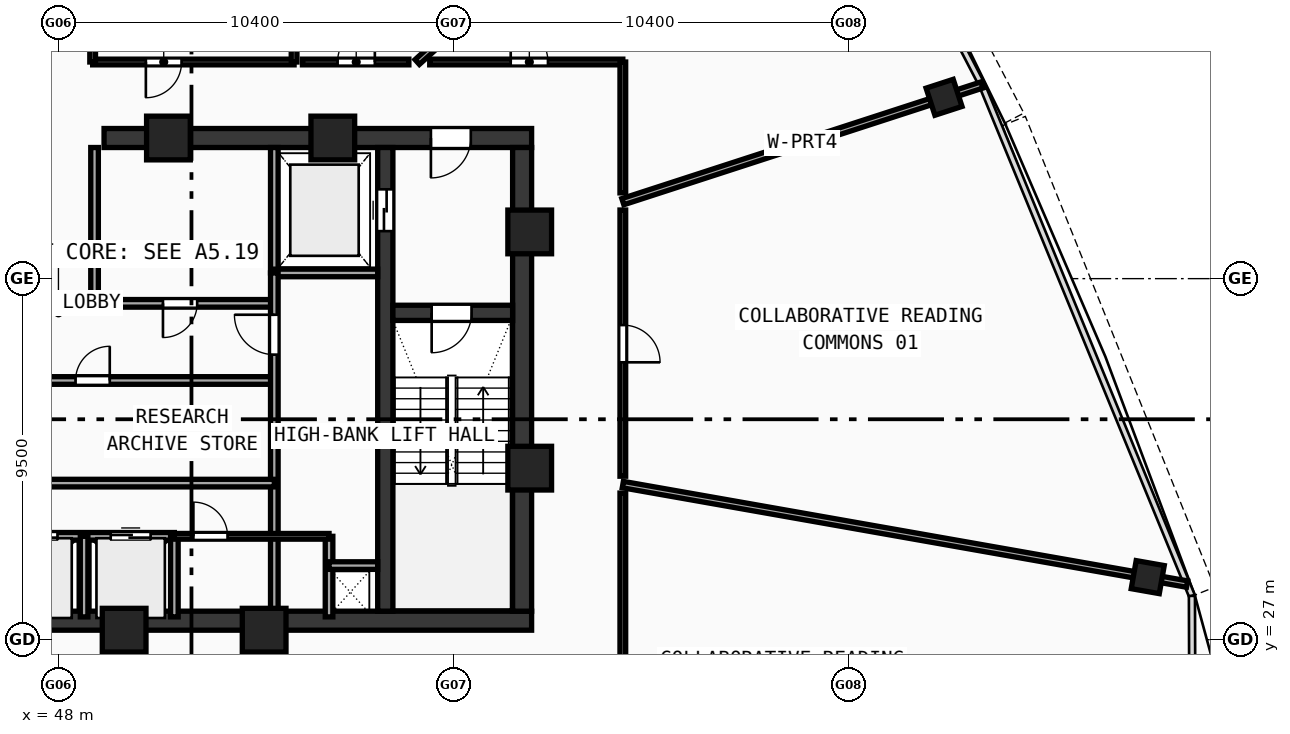
"""IFC4 building model, lengths in metres.
Left out: names, types, materials, properties, quantities, classifications, styles, units other than length and angle.
Written with IfcOpenShell. Run it as: python <this file> out.ifc"""

import sys

from ifc_helpers import new_model, si_unit, direction, frame, frame_2d, origin, origin_with_axes, origin_2d, place, context, subcontext, project, spatial, rectangle, hollow_rectangle, extrude, source, transform, mapped, element, fill, save


model = new_model("IFC4")
c1 = context("Model", 3, precision=1e-05, world=origin(), true_north=direction((0.0, 1.0)))
c2 = subcontext(c1, "Body", "Model", "MODEL_VIEW")
j1 = project(units=[si_unit("LENGTHUNIT", "METRE"), si_unit("PLANEANGLEUNIT", "RADIAN")], contexts=[c1])
p1 = place(None, origin())
s1 = spatial("IfcSite", under=j1, at=p1, CompositionType="ELEMENT")
p2 = place(p1, origin())
s2 = spatial("IfcBuilding", under=s1, at=p2, CompositionType="ELEMENT")
p3 = place(p2, frame((0.0, 0.0, 311.13)))
s3 = spatial("IfcBuildingStorey", under=s2, at=p3, CompositionType="ELEMENT", Elevation=311.13)
p4 = place(p3, frame((35.55, 27.5, 0.0), z_axis=(0.0, 0.0, 1.0), x_axis=(1.0, 0.0, 0.0)))
e1 = element("IfcWall", 1, at=p4, inside=s3, PredefinedType="SHEAR", context=c2, shape_type="SweptSolid", body=[
    extrude(rectangle(XDim=24.9, YDim=0.5, at=frame_2d((12.45, 0.0))), origin(), (0.0, 0.0, 1.0), 3.47),
])
p5 = place(p3, frame((49.2, 40.2, 0.0), z_axis=(0.0, 0.0, 1.0), x_axis=(1.0, 0.0, 0.0)))
e2 = element("IfcWall", 2, at=p5, inside=s3, PredefinedType="SHEAR", context=c2, shape_type="SweptSolid", body=[
    extrude(rectangle(XDim=11.25, YDim=0.5, at=frame_2d((5.625, 0.0))), origin(), (0.0, 0.0, 1.0), 3.47),
])
p6 = place(p5, frame((8.6, 0.0, 0.0)))
e3 = element("IfcOpeningElement", 3, at=p6, cuts=e2, PredefinedType="OPENING", context=c2, shape_type="SweptSolid", body=[
    extrude(rectangle(XDim=1.05, YDim=2.1, at=frame_2d((0.525, 1.05))), frame((0.0, 0.26, 0.0), z_axis=(0.0, -1.0, 0.0), x_axis=(1.0, 0.0, 0.0)), (0.0, 0.0, 1.0), 0.52),
])
p7 = place(p3, frame((60.2, 27.75, 0.0), z_axis=(0.0, 0.0, 1.0), x_axis=(0.0, 1.0, 0.0)))
e4 = element("IfcWall", 4, at=p7, inside=s3, PredefinedType="SHEAR", context=c2, shape_type="SweptSolid", body=[
    extrude(rectangle(XDim=12.2, YDim=0.5, at=frame_2d((6.1, 0.0))), origin(), (0.0, 0.0, 1.0), 3.47),
])
p8 = place(p3, frame((56.6, 27.75, 0.0), z_axis=(0.0, 0.0, 1.0), x_axis=(0.0, 1.0, 0.0)))
e5 = element("IfcWall", 5, at=p8, inside=s3, PredefinedType="SHEAR", context=c2, shape_type="SweptSolid", body=[
    extrude(rectangle(XDim=12.2, YDim=0.4, at=frame_2d((6.1, 0.0))), origin(), (0.0, 0.0, 1.0), 3.47),
])
p9 = place(p8, frame((10.0, 0.0, 0.0)))
e6 = element("IfcOpeningElement", 6, at=p9, cuts=e5, PredefinedType="OPENING", context=c2, shape_type="SweptSolid", body=[
    extrude(rectangle(XDim=1.1, YDim=2.1, at=frame_2d((0.55, 1.05))), frame((0.0, 0.21, 0.0), z_axis=(0.0, -1.0, 0.0), x_axis=(1.0, 0.0, 0.0)), (0.0, 0.0, 1.0), 0.42),
])
p10 = place(p3, frame((56.8, 35.6, 0.0), z_axis=(0.0, 0.0, 1.0), x_axis=(1.0, 0.0, 0.0)))
e7 = element("IfcWall", 7, at=p10, inside=s3, PredefinedType="SHEAR", context=c2, shape_type="SweptSolid", body=[
    extrude(rectangle(XDim=3.15, YDim=0.4, at=frame_2d((1.575, 0.0))), origin(), (0.0, 0.0, 1.0), 3.47),
])
p11 = place(p10, frame((1.02, 0.0, 0.0)))
e8 = element("IfcOpeningElement", 8, at=p11, cuts=e7, PredefinedType="OPENING", context=c2, shape_type="SweptSolid", body=[
    extrude(rectangle(XDim=1.05, YDim=2.1, at=frame_2d((0.525, 1.05))), frame((0.0, 0.21, 0.0), z_axis=(0.0, -1.0, 0.0), x_axis=(1.0, 0.0, 0.0)), (0.0, 0.0, 1.0), 0.42),
])
m1 = source(origin(), c2, "Body", "SweptSolid", [
    extrude(hollow_rectangle(XDim=1.15, YDim=1.15, WallThickness=0.048, at=origin_2d()), origin(), (0.0, 0.0, 1.0), 3.73),
])
for number, where, z_axis, x_axis in (
    (9, (49.729, 27.25, -0.26), (0.0, 0.0, 1.0), (1.0, 0.0, 0.0)),
    (10, (53.412, 27.25, -0.26), (0.0, 0.0, 1.0), (1.0, 0.0, 0.0)),
    (11, (60.4, 31.513, -0.26), (0.0, 0.0, 1.0), (1.0, 0.0, 0.0)),
    (12, (60.4, 37.729, -0.26), (0.0, 0.0, 1.0), (1.0, 0.0, 0.0)),
    (13, (55.219, 40.2, -0.26), (0.0, 0.0, 1.0), (1.0, 0.0, 0.0)),
    (14, (50.894, 40.2, -0.26), (0.0, 0.0, 1.0), (1.0, 0.0, 0.0)),
):
    element("IfcColumn", number, at=place(p3, frame(where, z_axis=z_axis, x_axis=x_axis)), inside=s3, PredefinedType="COLUMN", context=c2, shape_type="MappedRepresentation", body=[
        mapped(m1, transform((0.0, 0.0, 0.0), scale=1.0)),
    ])
m2 = source(origin(), c2, "Body", "SweptSolid", [
    extrude(hollow_rectangle(XDim=0.75, YDim=0.75, WallThickness=0.028, at=origin_2d()), origin(), (0.0, 0.0, 1.0), 3.73),
])
for number, where, z_axis, x_axis in (
    (15, (76.662, 28.646, -0.26), (0.0, 0.0, 1.0), (0.174, 0.985, 0.0)),
    (16, (71.302, 41.271, -0.26), (0.0, 0.0, 1.0), (-0.309, 0.951, 0.0)),
):
    element("IfcColumn", number, at=place(p3, frame(where, z_axis=z_axis, x_axis=x_axis)), inside=s3, PredefinedType="COLUMN", context=c2, shape_type="MappedRepresentation", body=[
        mapped(m2, transform((0.0, 0.0, 0.0), scale=1.0)),
    ])
p12 = place(p3, frame((53.68, 36.65, 0.0), z_axis=(0.0, 0.0, 1.0), x_axis=(0.0, 1.0, 0.0)))
e17 = element("IfcWall", 17, at=p12, inside=s3, PredefinedType="SOLIDWALL", context=c2, shape_type="SweptSolid", body=[
    extrude(rectangle(XDim=3.3, YDim=0.2, at=frame_2d((1.65, 0.0))), origin(), (0.0, 0.0, 1.0), 3.47),
])
p13 = place(p3, frame((53.68, 36.65, 0.0), z_axis=(0.0, 0.0, 1.0), x_axis=(1.0, 0.0, 0.0)))
e18 = element("IfcWall", 18, at=p13, inside=s3, PredefinedType="SOLIDWALL", context=c2, shape_type="SweptSolid", body=[
    extrude(rectangle(XDim=2.72, YDim=0.2, at=frame_2d((1.36, 0.0))), origin(), (0.0, 0.0, 1.0), 3.47),
])
p14 = place(p3, frame((48.95, 35.85, 0.0), z_axis=(0.0, 0.0, 1.0), x_axis=(1.0, 0.0, 0.0)))
e19 = element("IfcWall", 19, at=p14, inside=s3, PredefinedType="SOLIDWALL", context=c2, shape_type="SweptSolid", body=[
    extrude(rectangle(XDim=4.73, YDim=0.2, at=frame_2d((2.365, 0.0))), origin(), (0.0, 0.0, 1.0), 3.47),
])
p15 = place(p14, frame((1.8, 0.0, 0.0)))
e20 = element("IfcOpeningElement", 20, at=p15, cuts=e19, PredefinedType="OPENING", context=c2, shape_type="SweptSolid", body=[
    extrude(rectangle(XDim=0.9, YDim=2.1, at=frame_2d((0.45, 1.05))), frame((0.0, 0.11, 0.0), z_axis=(0.0, -1.0, 0.0), x_axis=(1.0, 0.0, 0.0)), (0.0, 0.0, 1.0), 0.22),
])
p16 = place(p3, frame((48.95, 35.85, 0.0), z_axis=(0.0, 0.0, 1.0), x_axis=(0.0, 1.0, 0.0)))
e21 = element("IfcWall", 21, at=p16, inside=s3, PredefinedType="SOLIDWALL", context=c2, shape_type="SweptSolid", body=[
    extrude(rectangle(XDim=4.1, YDim=0.2, at=frame_2d((2.05, 0.0))), origin(), (0.0, 0.0, 1.0), 3.47),
])
p17 = place(p3, frame((43.85, 33.82, 0.0), z_axis=(0.0, 0.0, 1.0), x_axis=(1.0, 0.0, 0.0)))
e22 = element("IfcWall", 22, at=p17, inside=s3, PredefinedType="SOLIDWALL", context=c2, shape_type="SweptSolid", body=[
    extrude(rectangle(XDim=9.83, YDim=0.2, at=frame_2d((4.915, 0.0))), origin(), (0.0, 0.0, 1.0), 3.47),
])
p18 = place(p17, frame((1.2, 0.0, 0.0)))
e23 = element("IfcOpeningElement", 23, at=p18, cuts=e22, PredefinedType="OPENING", context=c2, shape_type="SweptSolid", body=[
    extrude(rectangle(XDim=0.9, YDim=2.1, at=frame_2d((0.45, 1.05))), frame((0.0, 0.11, 0.0), z_axis=(0.0, -1.0, 0.0), x_axis=(1.0, 0.0, 0.0)), (0.0, 0.0, 1.0), 0.22),
])
p19 = place(p17, frame((4.6, 0.0, 0.0)))
e24 = element("IfcOpeningElement", 24, at=p19, cuts=e22, PredefinedType="OPENING", context=c2, shape_type="SweptSolid", body=[
    extrude(rectangle(XDim=0.9, YDim=2.1, at=frame_2d((0.45, 1.05))), frame((0.0, 0.11, 0.0), z_axis=(0.0, -1.0, 0.0), x_axis=(1.0, 0.0, 0.0)), (0.0, 0.0, 1.0), 0.22),
])
p20 = place(p3, frame((53.68, 27.6, 0.0), z_axis=(0.0, 0.0, 1.0), x_axis=(0.0, 1.0, 0.0)))
e25 = element("IfcWall", 25, at=p20, inside=s3, PredefinedType="SOLIDWALL", context=c2, shape_type="SweptSolid", body=[
    extrude(rectangle(XDim=9.05, YDim=0.2, at=frame_2d((4.525, 0.0))), origin(), (0.0, 0.0, 1.0), 3.47),
])
p21 = place(p20, frame((6.9, 0.0, 0.0)))
e26 = element("IfcOpeningElement", 26, at=p21, cuts=e25, PredefinedType="OPENING", context=c2, shape_type="SweptSolid", body=[
    extrude(rectangle(XDim=1.05, YDim=2.1, at=frame_2d((0.525, 1.05))), frame((0.0, 0.11, 0.0), z_axis=(0.0, -1.0, 0.0), x_axis=(1.0, 0.0, 0.0)), (0.0, 0.0, 1.0), 0.22),
])
p22 = place(p3, frame((43.85, 29.72, 0.0), z_axis=(0.0, 0.0, 1.0), x_axis=(1.0, 0.0, 0.0)))
e27 = element("IfcWall", 27, at=p22, inside=s3, PredefinedType="SOLIDWALL", context=c2, shape_type="SweptSolid", body=[
    extrude(rectangle(XDim=7.2, YDim=0.2, at=frame_2d((3.6, 0.0))), origin(), (0.0, 0.0, 1.0), 3.47),
])
p23 = place(p22, frame((0.625, 0.0, 0.0)))
e28 = element("IfcOpeningElement", 28, at=p23, cuts=e27, PredefinedType="OPENING", context=c2, shape_type="SweptSolid", body=[
    extrude(rectangle(XDim=1.05, YDim=2.1, at=frame_2d((0.525, 1.05))), frame((0.0, 0.11, 0.0), z_axis=(0.0, -1.0, 0.0), x_axis=(1.0, 0.0, 0.0)), (0.0, 0.0, 1.0), 0.22),
])
p24 = place(p22, frame((3.075, 0.0, 0.0)))
e29 = element("IfcOpeningElement", 29, at=p24, cuts=e27, PredefinedType="OPENING", context=c2, shape_type="SweptSolid", body=[
    extrude(rectangle(XDim=1.05, YDim=2.1, at=frame_2d((0.525, 1.05))), frame((0.0, 0.11, 0.0), z_axis=(0.0, -1.0, 0.0), x_axis=(1.0, 0.0, 0.0)), (0.0, 0.0, 1.0), 0.22),
])
p25 = place(p22, frame((5.525, 0.0, 0.0)))
e30 = element("IfcOpeningElement", 30, at=p25, cuts=e27, PredefinedType="OPENING", context=c2, shape_type="SweptSolid", body=[
    extrude(rectangle(XDim=1.05, YDim=2.1, at=frame_2d((0.525, 1.05))), frame((0.0, 0.11, 0.0), z_axis=(0.0, -1.0, 0.0), x_axis=(1.0, 0.0, 0.0)), (0.0, 0.0, 1.0), 0.22),
])
p26 = place(p3, frame((51.05, 27.6, 0.0), z_axis=(0.0, 0.0, 1.0), x_axis=(0.0, 1.0, 0.0)))
e31 = element("IfcWall", 31, at=p26, inside=s3, PredefinedType="SOLIDWALL", context=c2, shape_type="SweptSolid", body=[
    extrude(rectangle(XDim=2.12, YDim=0.2, at=frame_2d((1.06, 0.0))), origin(), (0.0, 0.0, 1.0), 3.47),
])
p27 = place(p3, frame((43.85, 31.12, 0.0), z_axis=(0.0, 0.0, 1.0), x_axis=(1.0, 0.0, 0.0)))
e32 = element("IfcWall", 32, at=p27, inside=s3, PredefinedType="SOLIDWALL", context=c2, shape_type="SweptSolid", body=[
    extrude(rectangle(XDim=9.83, YDim=0.2, at=frame_2d((4.915, 0.0))), origin(), (0.0, 0.0, 1.0), 3.47),
])
for number, where, z_axis, x_axis in (
    (33, (48.675, 27.6, 0.0), (0.0, 0.0, 1.0), (0.0, 1.0, 0.0)),
    (34, (55.12, 27.6, 0.0), (0.0, 0.0, 1.0), (0.0, 1.0, 0.0)),
):
    element("IfcWall", number, at=place(p3, frame(where, z_axis=z_axis, x_axis=x_axis)), inside=s3, PredefinedType="SOLIDWALL", context=c2, shape_type="SweptSolid", body=[
        extrude(rectangle(XDim=2.12, YDim=0.2, at=frame_2d((1.06, 0.0))), origin(), (0.0, 0.0, 1.0), 3.47),
    ])
p28 = place(p3, frame((55.12, 28.95, 0.0), z_axis=(0.0, 0.0, 1.0), x_axis=(1.0, 0.0, 0.0)))
e35 = element("IfcWall", 35, at=p28, inside=s3, PredefinedType="SOLIDWALL", context=c2, shape_type="SweptSolid", body=[
    extrude(rectangle(XDim=1.28, YDim=0.2, at=frame_2d((0.64, 0.0))), origin(), (0.0, 0.0, 1.0), 3.47),
])
p29 = place(p3, frame((51.05, 29.72, 0.0), z_axis=(0.0, 0.0, 1.0), x_axis=(1.0, 0.0, 0.0)))
e36 = element("IfcWall", 36, at=p29, inside=s3, PredefinedType="PARTITIONING", context=c2, shape_type="SweptSolid", body=[
    extrude(rectangle(XDim=4.07, YDim=0.15, at=frame_2d((2.035, 0.0))), origin(), (0.0, 0.0, 1.0), 3.47),
])
p30 = place(p29, frame((0.5, 0.0, 0.0)))
e37 = element("IfcOpeningElement", 37, at=p30, cuts=e36, PredefinedType="OPENING", context=c2, shape_type="SweptSolid", body=[
    extrude(rectangle(XDim=0.9, YDim=2.1, at=frame_2d((0.45, 1.05))), frame((0.0, 0.085, 0.0), z_axis=(0.0, -1.0, 0.0), x_axis=(1.0, 0.0, 0.0)), (0.0, 0.0, 1.0), 0.17),
])
p31 = place(p3, frame((48.9, 42.2, 0.0), z_axis=(0.0, 0.0, 1.0), x_axis=(1.0, 0.0, 0.0)))
e38 = element("IfcWall", 38, at=p31, inside=s3, PredefinedType="PARTITIONING", context=c2, shape_type="SweptSolid", body=[
    extrude(rectangle(XDim=5.3, YDim=0.15, at=frame_2d((2.65, 0.0))), origin(), (0.0, 0.0, 1.0), 2.87),
])
p32 = place(p31, frame((1.4, 0.0, 0.0)))
e39 = element("IfcOpeningElement", 39, at=p32, cuts=e38, PredefinedType="OPENING", context=c2, shape_type="SweptSolid", body=[
    extrude(rectangle(XDim=0.94, YDim=2.1, at=frame_2d((0.47, 1.05))), frame((0.0, 0.085, 0.0), z_axis=(0.0, -1.0, 0.0), x_axis=(1.0, 0.0, 0.0)), (0.0, 0.0, 1.0), 0.17),
])
for number, where, z_axis, x_axis in (
    (40, (48.9, 42.2, 0.0), (0.0, 0.0, 1.0), (0.0, 1.0, 0.0)),
    (41, (54.2, 42.2, 0.0), (0.0, 0.0, 1.0), (0.0, 1.0, 0.0)),
):
    element("IfcWall", number, at=place(p3, frame(where, z_axis=z_axis, x_axis=x_axis)), inside=s3, PredefinedType="PARTITIONING", context=c2, shape_type="SweptSolid", body=[
        extrude(rectangle(XDim=3.6, YDim=0.15, at=frame_2d((1.8, 0.0))), origin(), (0.0, 0.0, 1.0), 3.47),
    ])
p33 = place(p3, frame((62.85, 38.525, 0.0), z_axis=(0.0, 0.0, 1.0), x_axis=(0.951056273407, 0.309017741906, 0.0)))
e42 = element("IfcWall", 42, at=p33, inside=s3, PredefinedType="PARTITIONING", context=c2, shape_type="SweptSolid", body=[
    extrude(rectangle(XDim=9.937, YDim=0.17, at=frame_2d((4.969, 0.0))), origin(), (0.0, 0.0, 1.0), 2.87),
])
p34 = place(p3, frame((57.44, 42.2, 0.0), z_axis=(0.0, 0.0, 1.0), x_axis=(0.743143971996, 0.669131554245, 0.0)))
e43 = element("IfcWall", 43, at=p34, inside=s3, PredefinedType="PARTITIONING", context=c2, shape_type="SweptSolid", body=[
    extrude(rectangle(XDim=13.34, YDim=0.17, at=frame_2d((6.67, 0.0))), origin(), (0.0, 0.0, 1.0), 2.87),
])
p35 = place(p3, frame((62.85, 31.082, 0.0), z_axis=(0.0, 0.0, 1.0), x_axis=(0.984808005161, -0.173646747654, 0.0)))
e44 = element("IfcWall", 44, at=p35, inside=s3, PredefinedType="PARTITIONING", context=c2, shape_type="SweptSolid", body=[
    extrude(rectangle(XDim=15.075, YDim=0.17, at=frame_2d((7.537, 0.0))), origin(), (0.0, 0.0, 1.0), 2.87),
])
p36 = place(p3, frame((54.42, 42.2, 0.0), z_axis=(0.0, 0.0, 1.0), x_axis=(1.0, 0.0, 0.0)))
e45 = element("IfcWall", 45, at=p36, inside=s3, PredefinedType="PARTITIONING", context=c2, shape_type="SweptSolid", body=[
    extrude(rectangle(XDim=2.801, YDim=0.15, at=frame_2d((1.4, 0.0))), origin(), (0.0, 0.0, 1.0), 2.87),
])
p37 = place(p36, frame((0.925, 0.0, 0.0)))
e46 = element("IfcOpeningElement", 46, at=p37, cuts=e45, PredefinedType="OPENING", context=c2, shape_type="SweptSolid", body=[
    extrude(rectangle(XDim=0.98, YDim=2.12, at=frame_2d((0.49, 1.06))), frame((0.0, 0.085, 0.0), z_axis=(0.0, -1.0, 0.0), x_axis=(1.0, 0.0, 0.0)), (0.0, 0.0, 1.0), 0.17),
])
p38 = place(p3, frame((57.769, 42.2, 0.0), z_axis=(0.0, 0.0, 1.0), x_axis=(1.0, 0.0, 0.0)))
e47 = element("IfcWall", 47, at=p38, inside=s3, PredefinedType="PARTITIONING", context=c2, shape_type="SweptSolid", body=[
    extrude(rectangle(XDim=5.081, YDim=0.15, at=frame_2d((2.541, 0.0))), origin(), (0.0, 0.0, 1.0), 3.12),
])
p39 = place(p38, frame((2.131, 0.0, 0.0)))
e48 = element("IfcOpeningElement", 48, at=p39, cuts=e47, PredefinedType="OPENING", context=c2, shape_type="SweptSolid", body=[
    extrude(rectangle(XDim=0.98, YDim=2.12, at=frame_2d((0.49, 1.06))), frame((0.0, 0.085, 0.0), z_axis=(0.0, -1.0, 0.0), x_axis=(1.0, 0.0, 0.0)), (0.0, 0.0, 1.0), 0.17),
])
p40 = place(p3, frame((62.85, 42.2, 0.0), z_axis=(0.0, 0.0, 1.0), x_axis=(0.0, -1.0, 0.0)))
e49 = element("IfcWall", 49, at=p40, inside=s3, PredefinedType="PARTITIONING", context=c2, shape_type="SweptSolid", body=[
    extrude(rectangle(XDim=3.444, YDim=0.15, at=frame_2d((1.722, 0.0))), origin(), (0.0, 0.0, 1.0), 3.12),
])
p41 = place(p3, frame((62.85, 38.305, 0.0), z_axis=(0.0, 0.0, 1.0), x_axis=(0.0, -1.0, 0.0)))
e50 = element("IfcWall", 50, at=p41, inside=s3, PredefinedType="PARTITIONING", context=c2, shape_type="SweptSolid", body=[
    extrude(rectangle(XDim=7.004, YDim=0.15, at=frame_2d((3.502, 0.0))), origin(), (0.0, 0.0, 1.0), 3.47),
])
p42 = place(p41, frame((3.027, 0.0, 0.0)))
e51 = element("IfcOpeningElement", 51, at=p42, cuts=e50, PredefinedType="OPENING", context=c2, shape_type="SweptSolid", body=[
    extrude(rectangle(XDim=0.98, YDim=2.12, at=frame_2d((0.49, 1.06))), frame((0.0, 0.085, 0.0), z_axis=(0.0, -1.0, 0.0), x_axis=(1.0, 0.0, 0.0)), (0.0, 0.0, 1.0), 0.17),
])
p43 = place(p3, frame((62.85, 30.858, 0.0), z_axis=(0.0, 0.0, 1.0), x_axis=(0.0, -1.0, 0.0)))
e52 = element("IfcWall", 52, at=p43, inside=s3, PredefinedType="PARTITIONING", context=c2, shape_type="SweptSolid", body=[
    extrude(rectangle(XDim=5.958, YDim=0.15, at=frame_2d((2.979, 0.0))), origin(), (0.0, 0.0, 1.0), 3.12),
])
m3 = source(origin(), c2, "Body", "SweptSolid", [
    extrude(rectangle(XDim=1.05, YDim=2.1, at=frame_2d((0.525, 1.05))), frame((0.0, 0.025, 0.0), z_axis=(0.0, -1.0, 0.0), x_axis=(1.0, 0.0, 0.0)), (0.0, 0.0, 1.0), 0.05),
])
p44 = place(p11, frame((1.05, 0.0, 0.0), z_axis=(0.0, 0.0, 1.0), x_axis=(-1.0, 0.0, 0.0)))
e53 = element("IfcDoor", 53, at=p44, inside=s3, OperationType="SINGLE_SWING_RIGHT", PredefinedType="DOOR", context=c2, shape_type="MappedRepresentation", body=[
    mapped(m3, transform((0.0, 0.0, 0.0), scale=1.0)),
])
fill(e8, e53)
p45 = place(p6, frame((1.05, 0.0, 0.0), z_axis=(0.0, 0.0, 1.0), x_axis=(-1.0, 0.0, 0.0)))
e54 = element("IfcDoor", 54, at=p45, inside=s3, OperationType="SINGLE_SWING_RIGHT", PredefinedType="DOOR", context=c2, shape_type="MappedRepresentation", body=[
    mapped(m3, transform((0.0, 0.0, 0.0), scale=1.0)),
])
fill(e3, e54)
m4 = source(origin(), c2, "Body", "SweptSolid", [
    extrude(rectangle(XDim=1.1, YDim=2.1, at=frame_2d((0.55, 1.05))), frame((0.0, 0.025, 0.0), z_axis=(0.0, -1.0, 0.0), x_axis=(1.0, 0.0, 0.0)), (0.0, 0.0, 1.0), 0.05),
])
p46 = place(p9, origin_with_axes())
e55 = element("IfcDoor", 55, at=p46, inside=s3, OperationType="DOUBLE_DOOR_SLIDING", PredefinedType="DOOR", context=c2, shape_type="MappedRepresentation", body=[
    mapped(m4, transform((0.0, 0.0, 0.0), scale=1.0)),
])
fill(e6, e55)
m5 = source(origin(), c2, "Body", "SweptSolid", [
    extrude(rectangle(XDim=0.9, YDim=2.1, at=frame_2d((0.45, 1.05))), frame((0.0, 0.025, 0.0), z_axis=(0.0, -1.0, 0.0), x_axis=(1.0, 0.0, 0.0)), (0.0, 0.0, 1.0), 0.05),
])
p47 = place(p15, frame((0.9, 0.0, 0.0), z_axis=(0.0, 0.0, 1.0), x_axis=(-1.0, 0.0, 0.0)))
e56 = element("IfcDoor", 56, at=p47, inside=s3, OperationType="SINGLE_SWING_RIGHT", PredefinedType="DOOR", context=c2, shape_type="MappedRepresentation", body=[
    mapped(m5, transform((0.0, 0.0, 0.0), scale=1.0)),
])
fill(e20, e56)
p48 = place(p19, origin_with_axes())
e57 = element("IfcDoor", 57, at=p48, inside=s3, OperationType="SINGLE_SWING_RIGHT", PredefinedType="DOOR", context=c2, shape_type="MappedRepresentation", body=[
    mapped(m5, transform((0.0, 0.0, 0.0), scale=1.0)),
])
fill(e24, e57)
p49 = place(p21, origin_with_axes())
e58 = element("IfcDoor", 58, at=p49, inside=s3, OperationType="SINGLE_SWING_RIGHT", PredefinedType="DOOR", context=c2, shape_type="MappedRepresentation", body=[
    mapped(m3, transform((0.0, 0.0, 0.0), scale=1.0)),
])
fill(e26, e58)
p50 = place(p24, origin_with_axes())
e59 = element("IfcDoor", 59, at=p50, inside=s3, OperationType="DOUBLE_DOOR_SLIDING", PredefinedType="DOOR", context=c2, shape_type="MappedRepresentation", body=[
    mapped(m3, transform((0.0, 0.0, 0.0), scale=1.0)),
])
fill(e29, e59)
p51 = place(p25, origin_with_axes())
e60 = element("IfcDoor", 60, at=p51, inside=s3, OperationType="DOUBLE_DOOR_SLIDING", PredefinedType="DOOR", context=c2, shape_type="MappedRepresentation", body=[
    mapped(m3, transform((0.0, 0.0, 0.0), scale=1.0)),
])
fill(e30, e60)
p52 = place(p30, origin_with_axes())
e61 = element("IfcDoor", 61, at=p52, inside=s3, OperationType="SINGLE_SWING_LEFT", PredefinedType="DOOR", context=c2, shape_type="MappedRepresentation", body=[
    mapped(m5, transform((0.0, 0.0, 0.0), scale=1.0)),
])
fill(e37, e61)
m6 = source(origin(), c2, "Body", "SweptSolid", [
    extrude(rectangle(XDim=0.94, YDim=2.1, at=frame_2d((0.47, 1.05))), frame((0.0, 0.025, 0.0), z_axis=(0.0, -1.0, 0.0), x_axis=(1.0, 0.0, 0.0)), (0.0, 0.0, 1.0), 0.05),
])
p53 = place(p32, frame((0.94, 0.0, 0.0), z_axis=(0.0, 0.0, 1.0), x_axis=(-1.0, 0.0, 0.0)))
e62 = element("IfcDoor", 62, at=p53, inside=s3, OperationType="SINGLE_SWING_RIGHT", PredefinedType="DOOR", context=c2, shape_type="MappedRepresentation", body=[
    mapped(m6, transform((0.0, 0.0, 0.0), scale=1.0)),
])
fill(e39, e62)
m7 = source(origin(), c2, "Body", "SweptSolid", [
    extrude(rectangle(XDim=0.98, YDim=2.12, at=frame_2d((0.49, 1.06))), frame((0.0, 0.025, 0.0), z_axis=(0.0, -1.0, 0.0), x_axis=(1.0, 0.0, 0.0)), (0.0, 0.0, 1.0), 0.05),
])
p54 = place(p42, origin_with_axes())
e63 = element("IfcDoor", 63, at=p54, inside=s3, OperationType="SINGLE_SWING_RIGHT", PredefinedType="DOOR", context=c2, shape_type="MappedRepresentation", body=[
    mapped(m7, transform((0.0, 0.0, 0.0), scale=1.0)),
])
fill(e51, e63)
p55 = place(p39, origin_with_axes())
e64 = element("IfcDoor", 64, at=p55, inside=s3, OperationType="SINGLE_SWING_LEFT", PredefinedType="DOOR", context=c2, shape_type="MappedRepresentation", body=[
    mapped(m7, transform((0.0, 0.0, 0.0), scale=1.0)),
])
fill(e48, e64)
p56 = place(p37, origin_with_axes())
e65 = element("IfcDoor", 65, at=p56, inside=s3, OperationType="SINGLE_SWING_RIGHT", PredefinedType="DOOR", context=c2, shape_type="MappedRepresentation", body=[
    mapped(m7, transform((0.0, 0.0, 0.0), scale=1.0)),
])
fill(e46, e65)
save(model, sys.argv[1])
